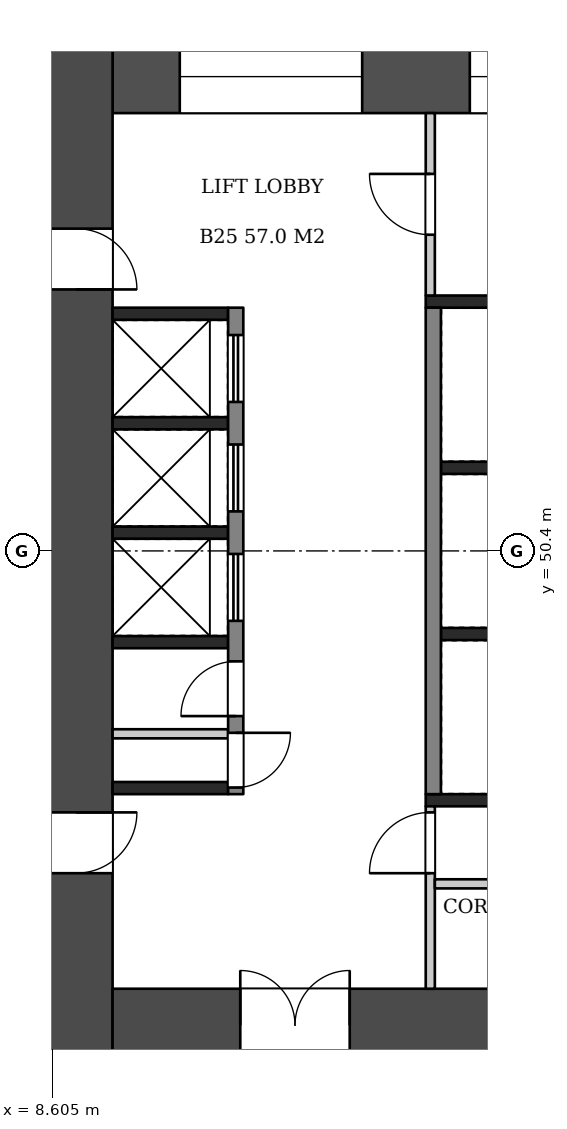
"""IFC4 building model, lengths in metres.
Left out: names, types, materials, properties, quantities, classifications, styles, units other than length and angle.
Written with IfcOpenShell. Run it as: python <this file> out.ifc"""

import sys

from ifc_helpers import new_model, si_unit, direction, frame, frame_2d, origin, place, context, subcontext, project, spatial, rectangle, extrude, element, fill, save


model = new_model("IFC4")
c1 = context("Model", 3, precision=1e-05, world=origin(), true_north=direction((0.0, 1.0)))
c2 = subcontext(c1, "Body", "Model", "MODEL_VIEW")
j1 = project(units=[si_unit("LENGTHUNIT", "METRE"), si_unit("PLANEANGLEUNIT", "RADIAN")], contexts=[c1])
p1 = place(None, origin())
s1 = spatial("IfcSite", under=j1, at=p1, CompositionType="ELEMENT")
p2 = place(p1, origin())
s2 = spatial("IfcBuilding", under=s1, at=p2, CompositionType="ELEMENT")
p3 = place(p2, frame((0.0, 0.0, 102.2)))
s3 = spatial("IfcBuildingStorey", under=s2, at=p3, CompositionType="ELEMENT", Elevation=102.2)
p4 = place(p3, frame((9.0, 58.8, 0.0), z_axis=(0.0, 0.0, 1.0), x_axis=(0.0, -1.0, 0.0)))
e1 = element("IfcWall", 1, at=p4, inside=s3, PredefinedType="SHEAR", context=c2, shape_type="SweptSolid", body=[
    extrude(rectangle(XDim=16.8, YDim=1.2, at=frame_2d((8.4, 0.0))), origin(), (0.0, 0.0, 1.0), 3.22),
])
p5 = place(p4, frame((3.1, 0.0, 0.0)))
e2 = element("IfcOpeningElement", 2, at=p5, cuts=e1, PredefinedType="OPENING", context=c2, shape_type="SweptSolid", body=[
    extrude(rectangle(XDim=1.0, YDim=2.1, at=frame_2d((0.5, 1.05))), frame((0.0, 0.61, 0.0), z_axis=(0.0, -1.0, 0.0), x_axis=(1.0, 0.0, 0.0)), (0.0, 0.0, 1.0), 1.22),
])
p6 = place(p4, frame((12.7, 0.0, 0.0)))
e3 = element("IfcOpeningElement", 3, at=p6, cuts=e1, PredefinedType="OPENING", context=c2, shape_type="SweptSolid", body=[
    extrude(rectangle(XDim=1.0, YDim=2.1, at=frame_2d((0.5, 1.05))), frame((0.0, 0.61, 0.0), z_axis=(0.0, -1.0, 0.0), x_axis=(1.0, 0.0, 0.0)), (0.0, 0.0, 1.0), 1.22),
])
p7 = place(p3, frame((9.6, 58.2, 0.0), z_axis=(0.0, 0.0, 1.0), x_axis=(1.0, 0.0, 0.0)))
e4 = element("IfcWall", 4, at=p7, inside=s3, PredefinedType="SHEAR", context=c2, shape_type="SweptSolid", body=[
    extrude(rectangle(XDim=14.4, YDim=1.2, at=frame_2d((7.2, 0.0))), origin(), (0.0, 0.0, 1.0), 3.22),
])
p8 = place(p7, frame((1.105, 0.0, 0.6)))
e5 = element("IfcOpeningElement", 5, at=p8, cuts=e4, PredefinedType="OPENING", context=c2, shape_type="SweptSolid", body=[
    extrude(rectangle(XDim=3.0, YDim=2.1, at=frame_2d((1.5, 1.05))), frame((0.0, 0.61, 0.0), z_axis=(0.0, -1.0, 0.0), x_axis=(1.0, 0.0, 0.0)), (0.0, 0.0, 1.0), 1.22),
])
p9 = place(p7, frame((5.875, 0.0, 0.6)))
e6 = element("IfcOpeningElement", 6, at=p9, cuts=e4, PredefinedType="OPENING", context=c2, shape_type="SweptSolid", body=[
    extrude(rectangle(XDim=2.4, YDim=2.1, at=frame_2d((1.2, 1.05))), frame((0.0, 0.61, 0.0), z_axis=(0.0, -1.0, 0.0), x_axis=(1.0, 0.0, 0.0)), (0.0, 0.0, 1.0), 1.22),
])
p10 = place(p7, frame((9.993, 0.0, 0.5)))
e7 = element("IfcOpeningElement", 7, at=p10, cuts=e4, PredefinedType="OPENING", context=c2, shape_type="SweptSolid", body=[
    extrude(rectangle(XDim=1.2, YDim=2.4, at=frame_2d((0.6, 1.2))), frame((0.0, 0.61, 0.0), z_axis=(0.0, -1.0, 0.0), x_axis=(1.0, 0.0, 0.0)), (0.0, 0.0, 1.0), 1.22),
])
p11 = place(p7, frame((12.197, 0.0, 0.5)))
e8 = element("IfcOpeningElement", 8, at=p11, cuts=e4, PredefinedType="OPENING", context=c2, shape_type="SweptSolid", body=[
    extrude(rectangle(XDim=1.2, YDim=2.4, at=frame_2d((0.6, 1.2))), frame((0.0, 0.61, 0.0), z_axis=(0.0, -1.0, 0.0), x_axis=(1.0, 0.0, 0.0)), (0.0, 0.0, 1.0), 1.22),
])
p12 = place(p3, frame((9.6, 42.6, 0.0), z_axis=(0.0, 0.0, 1.0), x_axis=(1.0, 0.0, 0.0)))
e9 = element("IfcWall", 9, at=p12, inside=s3, PredefinedType="SHEAR", context=c2, shape_type="SweptSolid", body=[
    extrude(rectangle(XDim=14.4, YDim=1.2, at=frame_2d((7.2, 0.0))), origin(), (0.0, 0.0, 1.0), 3.22),
])
p13 = place(p12, frame((2.1, 0.0, 0.0)))
e10 = element("IfcOpeningElement", 10, at=p13, cuts=e9, PredefinedType="OPENING", context=c2, shape_type="SweptSolid", body=[
    extrude(rectangle(XDim=1.8, YDim=2.1, at=frame_2d((0.9, 1.05))), frame((0.0, 0.61, 0.0), z_axis=(0.0, -1.0, 0.0), x_axis=(1.0, 0.0, 0.0)), (0.0, 0.0, 1.0), 1.22),
])
for number, where, z_axis, x_axis in (
    (11, (9.6, 54.3, 0.0), (0.0, 0.0, 1.0), (1.0, 0.0, 0.0)),
    (12, (9.6, 52.5, 0.0), (0.0, 0.0, 1.0), (1.0, 0.0, 0.0)),
    (13, (9.6, 50.7, 0.0), (0.0, 0.0, 1.0), (1.0, 0.0, 0.0)),
    (14, (9.6, 48.9, 0.0), (0.0, 0.0, 1.0), (1.0, 0.0, 0.0)),
    (15, (9.6, 46.5, 0.0), (0.0, 0.0, 1.0), (1.0, 0.0, 0.0)),
):
    element("IfcWall", number, at=place(p3, frame(where, z_axis=z_axis, x_axis=x_axis)), inside=s3, PredefinedType="SHEAR", context=c2, shape_type="SweptSolid", body=[
        extrude(rectangle(XDim=1.9, YDim=0.2, at=frame_2d((0.95, 0.0))), origin(), (0.0, 0.0, 1.0), 3.22),
    ])
p14 = place(p3, frame((9.6, 47.393, 0.0), z_axis=(0.0, 0.0, 1.0), x_axis=(1.0, 0.0, 0.0)))
e16 = element("IfcWall", 16, at=p14, inside=s3, PredefinedType="PARTITIONING", context=c2, shape_type="SweptSolid", body=[
    extrude(rectangle(XDim=1.9, YDim=0.15, at=frame_2d((0.95, 0.0))), origin(), (0.0, 0.0, 1.0), 3.22),
])
p15 = place(p3, frame((11.625, 54.4, 0.0), z_axis=(0.0, 0.0, 1.0), x_axis=(0.0, -1.0, 0.0)))
e17 = element("IfcWall", 17, at=p15, inside=s3, PredefinedType="SHEAR", context=c2, shape_type="SweptSolid", body=[
    extrude(rectangle(XDim=8.0, YDim=0.25, at=frame_2d((4.0, 0.0))), origin(), (0.0, 0.0, 1.0), 3.22),
])
p16 = place(p15, frame((0.45, 0.0, 0.0)))
e18 = element("IfcOpeningElement", 18, at=p16, cuts=e17, PredefinedType="OPENING", context=c2, shape_type="SweptSolid", body=[
    extrude(rectangle(XDim=1.1, YDim=2.1, at=frame_2d((0.55, 1.05))), frame((0.0, 0.135, 0.0), z_axis=(0.0, -1.0, 0.0), x_axis=(1.0, 0.0, 0.0)), (0.0, 0.0, 1.0), 0.27),
])
p17 = place(p15, frame((2.25, 0.0, 0.0)))
e19 = element("IfcOpeningElement", 19, at=p17, cuts=e17, PredefinedType="OPENING", context=c2, shape_type="SweptSolid", body=[
    extrude(rectangle(XDim=1.1, YDim=2.1, at=frame_2d((0.55, 1.05))), frame((0.0, 0.135, 0.0), z_axis=(0.0, -1.0, 0.0), x_axis=(1.0, 0.0, 0.0)), (0.0, 0.0, 1.0), 0.27),
])
p18 = place(p15, frame((4.05, 0.0, 0.0)))
e20 = element("IfcOpeningElement", 20, at=p18, cuts=e17, PredefinedType="OPENING", context=c2, shape_type="SweptSolid", body=[
    extrude(rectangle(XDim=1.1, YDim=2.1, at=frame_2d((0.55, 1.05))), frame((0.0, 0.135, 0.0), z_axis=(0.0, -1.0, 0.0), x_axis=(1.0, 0.0, 0.0)), (0.0, 0.0, 1.0), 0.27),
])
p19 = place(p15, frame((5.816, 0.0, 0.0)))
e21 = element("IfcOpeningElement", 21, at=p19, cuts=e17, PredefinedType="OPENING", context=c2, shape_type="SweptSolid", body=[
    extrude(rectangle(XDim=0.9, YDim=2.1, at=frame_2d((0.45, 1.05))), frame((0.0, 0.135, 0.0), z_axis=(0.0, -1.0, 0.0), x_axis=(1.0, 0.0, 0.0)), (0.0, 0.0, 1.0), 0.27),
])
p20 = place(p15, frame((6.991, 0.0, 0.0)))
e22 = element("IfcOpeningElement", 22, at=p20, cuts=e17, PredefinedType="OPENING", context=c2, shape_type="SweptSolid", body=[
    extrude(rectangle(XDim=0.9, YDim=2.1, at=frame_2d((0.45, 1.05))), frame((0.0, 0.135, 0.0), z_axis=(0.0, -1.0, 0.0), x_axis=(1.0, 0.0, 0.0)), (0.0, 0.0, 1.0), 0.27),
])
for number, where, z_axis, x_axis in (
    (23, (15.0, 51.767, 0.0), (0.0, 0.0, 1.0), (1.0, 0.0, 0.0)),
    (24, (15.0, 49.033, 0.0), (0.0, 0.0, 1.0), (1.0, 0.0, 0.0)),
):
    element("IfcWall", number, at=place(p3, frame(where, z_axis=z_axis, x_axis=x_axis)), inside=s3, PredefinedType="SHEAR", context=c2, shape_type="SweptSolid", body=[
        extrude(rectangle(XDim=1.9, YDim=0.2, at=frame_2d((0.95, 0.0))), origin(), (0.0, 0.0, 1.0), 3.22),
    ])
p21 = place(p3, frame((14.875, 54.4, 0.0), z_axis=(0.0, 0.0, 1.0), x_axis=(0.0, -1.0, 0.0)))
e25 = element("IfcWall", 25, at=p21, inside=s3, PredefinedType="SHEAR", context=c2, shape_type="SweptSolid", body=[
    extrude(rectangle(XDim=8.0, YDim=0.25, at=frame_2d((4.0, 0.0))), origin(), (0.0, 0.0, 1.0), 3.22),
])
p22 = place(p3, frame((14.75, 54.5, 0.0), z_axis=(0.0, 0.0, 1.0), x_axis=(1.0, 0.0, 0.0)))
e26 = element("IfcWall", 26, at=p22, inside=s3, PredefinedType="SHEAR", context=c2, shape_type="SweptSolid", body=[
    extrude(rectangle(XDim=2.4, YDim=0.2, at=frame_2d((1.2, 0.0))), origin(), (0.0, 0.0, 1.0), 3.22),
])
p23 = place(p3, frame((14.825, 57.6, 0.0), z_axis=(0.0, 0.0, 1.0), x_axis=(0.0, -1.0, 0.0)))
e27 = element("IfcWall", 27, at=p23, inside=s3, PredefinedType="PARTITIONING", context=c2, shape_type="SweptSolid", body=[
    extrude(rectangle(XDim=3.0, YDim=0.15, at=frame_2d((1.5, 0.0))), origin(), (0.0, 0.0, 1.0), 3.22),
])
p24 = place(p23, frame((1.0, 0.0, 0.0)))
e28 = element("IfcOpeningElement", 28, at=p24, cuts=e27, PredefinedType="OPENING", context=c2, shape_type="SweptSolid", body=[
    extrude(rectangle(XDim=1.0, YDim=2.1, at=frame_2d((0.5, 1.05))), frame((0.0, 0.085, 0.0), z_axis=(0.0, -1.0, 0.0), x_axis=(1.0, 0.0, 0.0)), (0.0, 0.0, 1.0), 0.17),
])
p25 = place(p3, frame((14.75, 46.3, 0.0), z_axis=(0.0, 0.0, 1.0), x_axis=(1.0, 0.0, 0.0)))
e29 = element("IfcWall", 29, at=p25, inside=s3, PredefinedType="SHEAR", context=c2, shape_type="SweptSolid", body=[
    extrude(rectangle(XDim=9.25, YDim=0.2, at=frame_2d((4.625, 0.0))), origin(), (0.0, 0.0, 1.0), 3.22),
])
p26 = place(p3, frame((14.825, 46.2, 0.0), z_axis=(0.0, 0.0, 1.0), x_axis=(0.0, -1.0, 0.0)))
e30 = element("IfcWall", 30, at=p26, inside=s3, PredefinedType="PARTITIONING", context=c2, shape_type="SweptSolid", body=[
    extrude(rectangle(XDim=3.0, YDim=0.15, at=frame_2d((1.5, 0.0))), origin(), (0.0, 0.0, 1.0), 3.22),
])
p27 = place(p26, frame((0.1, 0.0, 0.0)))
e31 = element("IfcOpeningElement", 31, at=p27, cuts=e30, PredefinedType="OPENING", context=c2, shape_type="SweptSolid", body=[
    extrude(rectangle(XDim=1.0, YDim=2.1, at=frame_2d((0.5, 1.05))), frame((0.0, 0.085, 0.0), z_axis=(0.0, -1.0, 0.0), x_axis=(1.0, 0.0, 0.0)), (0.0, 0.0, 1.0), 0.17),
])
p28 = place(p3, frame((14.9, 44.925, 0.0), z_axis=(0.0, 0.0, 1.0), x_axis=(1.0, 0.0, 0.0)))
e32 = element("IfcWall", 32, at=p28, inside=s3, PredefinedType="PARTITIONING", context=c2, shape_type="SweptSolid", body=[
    extrude(rectangle(XDim=9.1, YDim=0.15, at=frame_2d((4.55, 0.0))), origin(), (0.0, 0.0, 1.0), 3.22),
])
p29 = place(p28, frame((4.05, 0.0, 0.0)))
e33 = element("IfcOpeningElement", 33, at=p29, cuts=e32, PredefinedType="OPENING", context=c2, shape_type="SweptSolid", body=[
    extrude(rectangle(XDim=1.0, YDim=2.1, at=frame_2d((0.5, 1.05))), frame((0.0, 0.085, 0.0), z_axis=(0.0, -1.0, 0.0), x_axis=(1.0, 0.0, 0.0)), (0.0, 0.0, 1.0), 0.17),
])
p30 = place(p5, origin())
e34 = element("IfcDoor", 34, at=p30, inside=s3, OperationType="SINGLE_SWING_RIGHT", PredefinedType="DOOR", context=c2, shape_type="SweptSolid", body=[
    extrude(rectangle(XDim=1.0, YDim=2.1, at=frame_2d((0.5, 1.05))), frame((0.0, 0.025, 0.0), z_axis=(0.0, -1.0, 0.0), x_axis=(1.0, 0.0, 0.0)), (0.0, 0.0, 1.0), 0.05),
])
fill(e2, e34)
p31 = place(p6, origin())
e35 = element("IfcDoor", 35, at=p31, inside=s3, OperationType="SINGLE_SWING_LEFT", PredefinedType="DOOR", context=c2, shape_type="SweptSolid", body=[
    extrude(rectangle(XDim=1.0, YDim=2.1, at=frame_2d((0.5, 1.05))), frame((0.0, 0.025, 0.0), z_axis=(0.0, -1.0, 0.0), x_axis=(1.0, 0.0, 0.0)), (0.0, 0.0, 1.0), 0.05),
])
fill(e3, e35)
p32 = place(p13, origin())
e36 = element("IfcDoor", 36, at=p32, inside=s3, OperationType="DOUBLE_DOOR_SINGLE_SWING", PredefinedType="DOOR", context=c2, shape_type="SweptSolid", body=[
    extrude(rectangle(XDim=1.8, YDim=2.1, at=frame_2d((0.9, 1.05))), frame((0.0, 0.025, 0.0), z_axis=(0.0, -1.0, 0.0), x_axis=(1.0, 0.0, 0.0)), (0.0, 0.0, 1.0), 0.05),
])
fill(e10, e36)
p33 = place(p16, origin())
e37 = element("IfcDoor", 37, at=p33, inside=s3, OperationType="DOUBLE_DOOR_SLIDING", PredefinedType="DOOR", context=c2, shape_type="SweptSolid", body=[
    extrude(rectangle(XDim=1.1, YDim=2.1, at=frame_2d((0.55, 1.05))), frame((0.0, 0.025, 0.0), z_axis=(0.0, -1.0, 0.0), x_axis=(1.0, 0.0, 0.0)), (0.0, 0.0, 1.0), 0.05),
])
fill(e18, e37)
p34 = place(p17, origin())
e38 = element("IfcDoor", 38, at=p34, inside=s3, OperationType="DOUBLE_DOOR_SLIDING", PredefinedType="DOOR", context=c2, shape_type="SweptSolid", body=[
    extrude(rectangle(XDim=1.1, YDim=2.1, at=frame_2d((0.55, 1.05))), frame((0.0, 0.025, 0.0), z_axis=(0.0, -1.0, 0.0), x_axis=(1.0, 0.0, 0.0)), (0.0, 0.0, 1.0), 0.05),
])
fill(e19, e38)
p35 = place(p18, origin())
e39 = element("IfcDoor", 39, at=p35, inside=s3, OperationType="DOUBLE_DOOR_SLIDING", PredefinedType="DOOR", context=c2, shape_type="SweptSolid", body=[
    extrude(rectangle(XDim=1.1, YDim=2.1, at=frame_2d((0.55, 1.05))), frame((0.0, 0.025, 0.0), z_axis=(0.0, -1.0, 0.0), x_axis=(1.0, 0.0, 0.0)), (0.0, 0.0, 1.0), 0.05),
])
fill(e20, e39)
p36 = place(p19, frame((0.9, 0.0, 0.0), z_axis=(0.0, 0.0, 1.0), x_axis=(-1.0, 0.0, 0.0)))
e40 = element("IfcDoor", 40, at=p36, inside=s3, OperationType="SINGLE_SWING_LEFT", PredefinedType="DOOR", context=c2, shape_type="SweptSolid", body=[
    extrude(rectangle(XDim=0.9, YDim=2.1, at=frame_2d((0.45, 1.05))), frame((0.0, 0.025, 0.0), z_axis=(0.0, -1.0, 0.0), x_axis=(1.0, 0.0, 0.0)), (0.0, 0.0, 1.0), 0.05),
])
fill(e21, e40)
p37 = place(p20, origin())
e41 = element("IfcDoor", 41, at=p37, inside=s3, OperationType="SINGLE_SWING_LEFT", PredefinedType="DOOR", context=c2, shape_type="SweptSolid", body=[
    extrude(rectangle(XDim=0.9, YDim=2.1, at=frame_2d((0.45, 1.05))), frame((0.0, 0.025, 0.0), z_axis=(0.0, -1.0, 0.0), x_axis=(1.0, 0.0, 0.0)), (0.0, 0.0, 1.0), 0.05),
])
fill(e22, e41)
p38 = place(p24, frame((1.0, 0.0, 0.0), z_axis=(0.0, 0.0, 1.0), x_axis=(-1.0, 0.0, 0.0)))
e42 = element("IfcDoor", 42, at=p38, inside=s3, OperationType="SINGLE_SWING_RIGHT", PredefinedType="DOOR", context=c2, shape_type="SweptSolid", body=[
    extrude(rectangle(XDim=1.0, YDim=2.1, at=frame_2d((0.5, 1.05))), frame((0.0, 0.025, 0.0), z_axis=(0.0, -1.0, 0.0), x_axis=(1.0, 0.0, 0.0)), (0.0, 0.0, 1.0), 0.05),
])
fill(e28, e42)
p39 = place(p27, frame((1.0, 0.0, 0.0), z_axis=(0.0, 0.0, 1.0), x_axis=(-1.0, 0.0, 0.0)))
e43 = element("IfcDoor", 43, at=p39, inside=s3, OperationType="SINGLE_SWING_LEFT", PredefinedType="DOOR", context=c2, shape_type="SweptSolid", body=[
    extrude(rectangle(XDim=1.0, YDim=2.1, at=frame_2d((0.5, 1.05))), frame((0.0, 0.025, 0.0), z_axis=(0.0, -1.0, 0.0), x_axis=(1.0, 0.0, 0.0)), (0.0, 0.0, 1.0), 0.05),
])
fill(e31, e43)
p40 = place(p8, origin())
e44 = element("IfcWindow", 44, at=p40, inside=s3, PartitioningType="SINGLE_PANEL", PredefinedType="WINDOW", context=c2, shape_type="SweptSolid", body=[
    extrude(rectangle(XDim=3.0, YDim=2.1, at=frame_2d((1.5, 1.05))), frame((0.0, 0.03, 0.0), z_axis=(0.0, -1.0, 0.0), x_axis=(1.0, 0.0, 0.0)), (0.0, 0.0, 1.0), 0.06),
])
fill(e5, e44)
p41 = place(p9, origin())
e45 = element("IfcWindow", 45, at=p41, inside=s3, PartitioningType="SINGLE_PANEL", PredefinedType="WINDOW", context=c2, shape_type="SweptSolid", body=[
    extrude(rectangle(XDim=2.4, YDim=2.1, at=frame_2d((1.2, 1.05))), frame((0.0, 0.03, 0.0), z_axis=(0.0, -1.0, 0.0), x_axis=(1.0, 0.0, 0.0)), (0.0, 0.0, 1.0), 0.06),
])
fill(e6, e45)
save(model, sys.argv[1])
